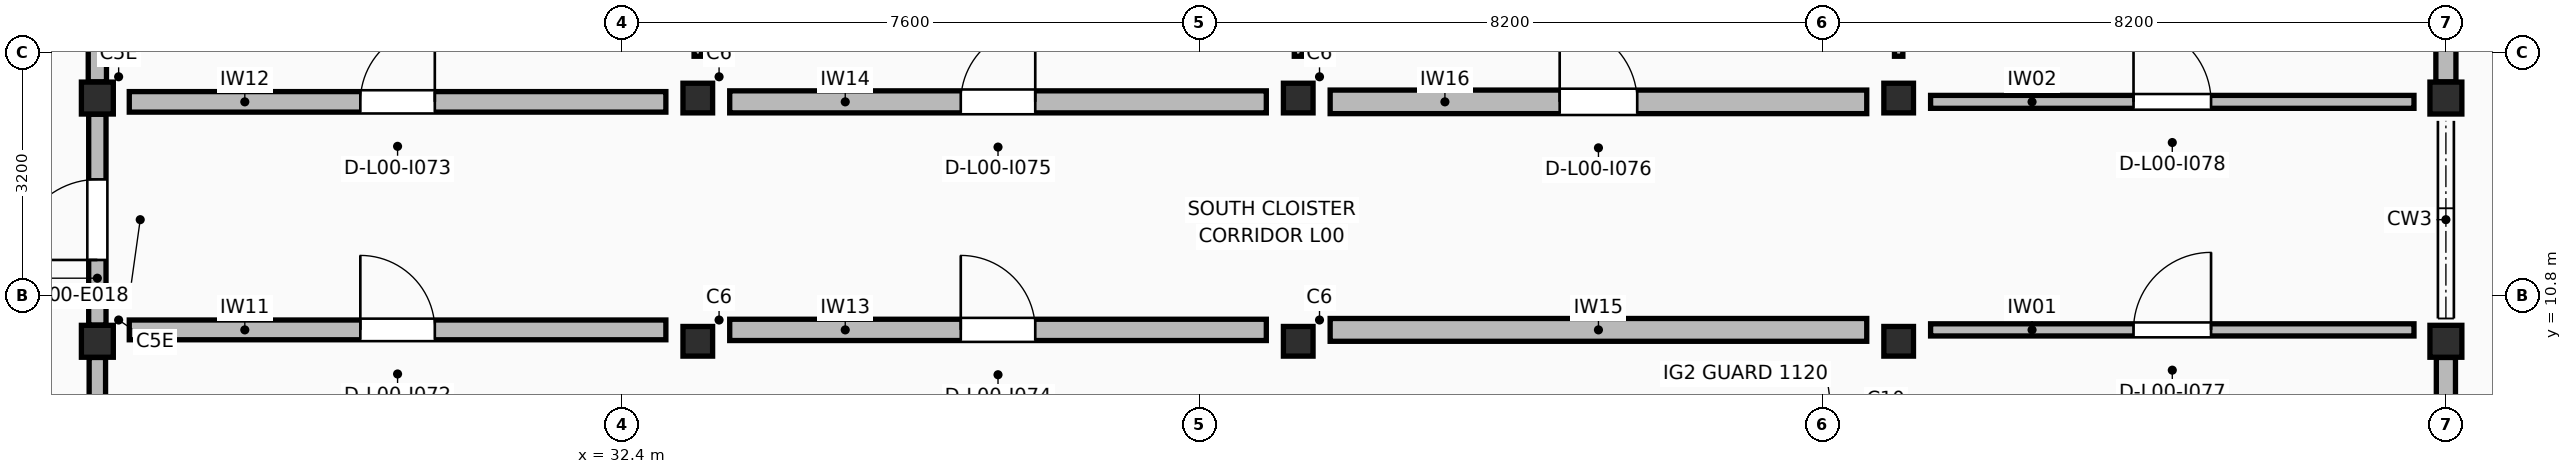
"""IFC4 building model, lengths in metres.
Left out: names, types, materials, properties, quantities, classifications, styles, units other than length and angle.
Written with IfcOpenShell. Run it as: python <this file> out.ifc"""

import sys

from ifc_helpers import new_model, si_unit, direction, frame, frame_2d, origin, origin_2d, place, context, subcontext, project, spatial, rectangle, extrude, element, fill, save


model = new_model("IFC4")
c1 = context("Model", 3, precision=1e-05, world=origin(), true_north=direction((0.0, 1.0)))
c2 = subcontext(c1, "Body", "Model", "MODEL_VIEW")
j1 = project(units=[si_unit("LENGTHUNIT", "METRE"), si_unit("PLANEANGLEUNIT", "RADIAN")], contexts=[c1])
p1 = place(None, origin())
s1 = spatial("IfcSite", under=j1, at=p1, CompositionType="ELEMENT")
p2 = place(p1, origin())
s2 = spatial("IfcBuilding", under=s1, at=p2, CompositionType="ELEMENT")
p3 = place(p2, origin())
s3 = spatial("IfcBuildingStorey", under=s2, at=p3, CompositionType="ELEMENT", Elevation=0.0)
for number, where, z_axis, x_axis in (
    (1, (25.5, 10.2, 0.0), (0.0, 0.0, 1.0), (1.0, 0.0, 0.0)),
    (2, (25.5, 13.4, 0.0), (0.0, 0.0, 1.0), (1.0, 0.0, 0.0)),
):
    element("IfcColumn", number, at=place(p3, frame(where, z_axis=z_axis, x_axis=x_axis)), inside=s3, PredefinedType="COLUMN", context=c2, shape_type="SweptSolid", body=[
        extrude(rectangle(XDim=0.42, YDim=0.42, at=origin_2d()), origin(), (0.0, 0.0, 1.0), 4.42),
    ])
for number, where, z_axis, x_axis in (
    (3, (33.4, 10.2, 0.0), (0.0, 0.0, 1.0), (1.0, 0.0, 0.0)),
    (4, (33.4, 13.4, 0.0), (0.0, 0.0, 1.0), (1.0, 0.0, 0.0)),
    (5, (41.3, 10.2, 0.0), (0.0, 0.0, 1.0), (1.0, 0.0, 0.0)),
    (6, (41.3, 13.4, 0.0), (0.0, 0.0, 1.0), (1.0, 0.0, 0.0)),
    (7, (49.2, 10.2, 0.0), (0.0, 0.0, 1.0), (1.0, 0.0, 0.0)),
    (8, (49.2, 13.4, 0.0), (0.0, 0.0, 1.0), (1.0, 0.0, 0.0)),
):
    element("IfcColumn", number, at=place(p3, frame(where, z_axis=z_axis, x_axis=x_axis)), inside=s3, PredefinedType="COLUMN", context=c2, shape_type="SweptSolid", body=[
        extrude(rectangle(XDim=0.39, YDim=0.39, at=origin_2d()), origin(), (0.0, 0.0, 1.0), 4.42),
    ])
for number, where, z_axis, x_axis in (
    (9, (56.4, 10.2, 0.0), (0.0, 0.0, 1.0), (1.0, 0.0, 0.0)),
    (10, (56.4, 13.4, 0.0), (0.0, 0.0, 1.0), (1.0, 0.0, 0.0)),
):
    element("IfcColumn", number, at=place(p3, frame(where, z_axis=z_axis, x_axis=x_axis)), inside=s3, PredefinedType="COLUMN", context=c2, shape_type="SweptSolid", body=[
        extrude(rectangle(XDim=0.42, YDim=0.42, at=origin_2d()), origin(), (0.0, 0.0, 1.0), 4.42),
    ])
p4 = place(p3, frame((25.5, 4.413, 0.0), z_axis=(0.0, 0.0, 1.0), x_axis=(0.0, 1.0, 0.0)))
e11 = element("IfcWall", 11, at=p4, inside=s3, PredefinedType="STANDARD", context=c2, shape_type="SweptSolid", body=[
    extrude(rectangle(XDim=5.574, YDim=0.216, at=frame_2d((2.787, 0.0))), origin(), (0.0, 0.0, 1.0), 3.4),
])
p5 = place(p4, frame((1.637, 0.0, 0.95)))
e12 = element("IfcOpeningElement", 12, at=p5, cuts=e11, PredefinedType="OPENING", context=c2, shape_type="SweptSolid", body=[
    extrude(rectangle(XDim=2.3, YDim=1.3, at=frame_2d((1.15, 0.65))), frame((0.0, 0.118, 0.0), z_axis=(0.0, -1.0, 0.0), x_axis=(1.0, 0.0, 0.0)), (0.0, 0.0, 1.0), 0.236),
])
p6 = place(p3, frame((25.5, 10.413, 0.0), z_axis=(0.0, 0.0, 1.0), x_axis=(0.0, 1.0, 0.0)))
e13 = element("IfcWall", 13, at=p6, inside=s3, PredefinedType="STANDARD", context=c2, shape_type="SweptSolid", body=[
    extrude(rectangle(XDim=2.774, YDim=0.228, at=frame_2d((1.387, 0.0))), origin(), (0.0, 0.0, 1.0), 3.4),
])
p7 = place(p6, frame((0.857, 0.0, 0.0)))
e14 = element("IfcOpeningElement", 14, at=p7, cuts=e13, PredefinedType="OPENING", context=c2, shape_type="SweptSolid", body=[
    extrude(rectangle(XDim=1.06, YDim=2.18, at=frame_2d((0.53, 1.09))), frame((0.0, 0.124, 0.0), z_axis=(0.0, -1.0, 0.0), x_axis=(1.0, 0.0, 0.0)), (0.0, 0.0, 1.0), 0.248),
])
p8 = place(p3, frame((25.5, 13.613, 0.0), z_axis=(0.0, 0.0, 1.0), x_axis=(0.0, 1.0, 0.0)))
e15 = element("IfcWall", 15, at=p8, inside=s3, PredefinedType="STANDARD", context=c2, shape_type="SweptSolid", body=[
    extrude(rectangle(XDim=7.174, YDim=0.24, at=frame_2d((3.587, 0.0))), origin(), (0.0, 0.0, 1.0), 3.4),
])
p9 = place(p8, frame((2.437, 0.0, 0.95)))
e16 = element("IfcOpeningElement", 16, at=p9, cuts=e15, PredefinedType="OPENING", context=c2, shape_type="SweptSolid", body=[
    extrude(rectangle(XDim=2.3, YDim=1.45, at=frame_2d((1.15, 0.725))), frame((0.0, 0.13, 0.0), z_axis=(0.0, -1.0, 0.0), x_axis=(1.0, 0.0, 0.0)), (0.0, 0.0, 1.0), 0.26),
])
p10 = place(p3, frame((56.4, 4.413, 0.0), z_axis=(0.0, 0.0, 1.0), x_axis=(0.0, 1.0, 0.0)))
e17 = element("IfcWall", 17, at=p10, inside=s3, PredefinedType="STANDARD", context=c2, shape_type="SweptSolid", body=[
    extrude(rectangle(XDim=5.574, YDim=0.252, at=frame_2d((2.787, 0.0))), origin(), (0.0, 0.0, 1.0), 3.4),
])
p11 = place(p10, frame((1.637, 0.0, 0.95)))
e18 = element("IfcOpeningElement", 18, at=p11, cuts=e17, PredefinedType="OPENING", context=c2, shape_type="SweptSolid", body=[
    extrude(rectangle(XDim=2.3, YDim=1.6, at=frame_2d((1.15, 0.8))), frame((0.0, 0.136, 0.0), z_axis=(0.0, -1.0, 0.0), x_axis=(1.0, 0.0, 0.0)), (0.0, 0.0, 1.0), 0.272),
])
p12 = place(p3, frame((56.4, 13.613, 0.0), z_axis=(0.0, 0.0, 1.0), x_axis=(0.0, 1.0, 0.0)))
e19 = element("IfcWall", 19, at=p12, inside=s3, PredefinedType="STANDARD", context=c2, shape_type="SweptSolid", body=[
    extrude(rectangle(XDim=7.174, YDim=0.264, at=frame_2d((3.587, 0.0))), origin(), (0.0, 0.0, 1.0), 3.4),
])
p13 = place(p12, frame((2.377, 0.0, 0.95)))
e20 = element("IfcOpeningElement", 20, at=p13, cuts=e19, PredefinedType="OPENING", context=c2, shape_type="SweptSolid", body=[
    extrude(rectangle(XDim=2.42, YDim=1.15, at=frame_2d((1.21, 0.575))), frame((0.0, 0.142, 0.0), z_axis=(0.0, -1.0, 0.0), x_axis=(1.0, 0.0, 0.0)), (0.0, 0.0, 1.0), 0.284),
])
p14 = place(p3, frame((25.92, 10.35, 0.0), z_axis=(0.0, 0.0, 1.0), x_axis=(1.0, 0.0, 0.0)))
e21 = element("IfcWall", 21, at=p14, inside=s3, PredefinedType="STANDARD", context=c2, shape_type="SweptSolid", body=[
    extrude(rectangle(XDim=7.06, YDim=0.26, at=frame_2d((3.53, 0.0))), origin(), (0.0, 0.0, 1.0), 3.38),
])
p15 = place(p14, frame((3.04, 0.0, 0.0)))
e22 = element("IfcOpeningElement", 22, at=p15, cuts=e21, PredefinedType="OPENING", context=c2, shape_type="SweptSolid", body=[
    extrude(rectangle(XDim=0.98, YDim=2.06, at=frame_2d((0.49, 1.03))), frame((0.0, 0.14, 0.0), z_axis=(0.0, -1.0, 0.0), x_axis=(1.0, 0.0, 0.0)), (0.0, 0.0, 1.0), 0.28),
])
p16 = place(p3, frame((25.92, 13.35, 0.0), z_axis=(0.0, 0.0, 1.0), x_axis=(1.0, 0.0, 0.0)))
e23 = element("IfcWall", 23, at=p16, inside=s3, PredefinedType="STANDARD", context=c2, shape_type="SweptSolid", body=[
    extrude(rectangle(XDim=7.06, YDim=0.27, at=frame_2d((3.53, 0.0))), origin(), (0.0, 0.0, 1.0), 3.38),
])
p17 = place(p16, frame((3.04, 0.0, 0.0)))
e24 = element("IfcOpeningElement", 24, at=p17, cuts=e23, PredefinedType="OPENING", context=c2, shape_type="SweptSolid", body=[
    extrude(rectangle(XDim=0.98, YDim=2.12, at=frame_2d((0.49, 1.06))), frame((0.0, 0.145, 0.0), z_axis=(0.0, -1.0, 0.0), x_axis=(1.0, 0.0, 0.0)), (0.0, 0.0, 1.0), 0.29),
])
p18 = place(p3, frame((33.82, 10.35, 0.0), z_axis=(0.0, 0.0, 1.0), x_axis=(1.0, 0.0, 0.0)))
e25 = element("IfcWall", 25, at=p18, inside=s3, PredefinedType="STANDARD", context=c2, shape_type="SweptSolid", body=[
    extrude(rectangle(XDim=7.06, YDim=0.28, at=frame_2d((3.53, 0.0))), origin(), (0.0, 0.0, 1.0), 3.38),
])
p19 = place(p18, frame((3.04, 0.0, 0.0)))
e26 = element("IfcOpeningElement", 26, at=p19, cuts=e25, PredefinedType="OPENING", context=c2, shape_type="SweptSolid", body=[
    extrude(rectangle(XDim=0.98, YDim=2.18, at=frame_2d((0.49, 1.09))), frame((0.0, 0.15, 0.0), z_axis=(0.0, -1.0, 0.0), x_axis=(1.0, 0.0, 0.0)), (0.0, 0.0, 1.0), 0.3),
])
p20 = place(p3, frame((33.82, 13.35, 0.0), z_axis=(0.0, 0.0, 1.0), x_axis=(1.0, 0.0, 0.0)))
e27 = element("IfcWall", 27, at=p20, inside=s3, PredefinedType="STANDARD", context=c2, shape_type="SweptSolid", body=[
    extrude(rectangle(XDim=7.06, YDim=0.29, at=frame_2d((3.53, 0.0))), origin(), (0.0, 0.0, 1.0), 3.38),
])
p21 = place(p20, frame((3.04, 0.0, 0.0)))
e28 = element("IfcOpeningElement", 28, at=p21, cuts=e27, PredefinedType="OPENING", context=c2, shape_type="SweptSolid", body=[
    extrude(rectangle(XDim=0.98, YDim=2.24, at=frame_2d((0.49, 1.12))), frame((0.0, 0.155, 0.0), z_axis=(0.0, -1.0, 0.0), x_axis=(1.0, 0.0, 0.0)), (0.0, 0.0, 1.0), 0.31),
])
p22 = place(p3, frame((41.72, 10.35, 0.0), z_axis=(0.0, 0.0, 1.0), x_axis=(1.0, 0.0, 0.0)))
e29 = element("IfcWall", 29, at=p22, inside=s3, PredefinedType="STANDARD", context=c2, shape_type="SweptSolid", body=[
    extrude(rectangle(XDim=7.06, YDim=0.3, at=frame_2d((3.53, 0.0))), origin(), (0.0, 0.0, 1.0), 3.38),
])
p23 = place(p3, frame((41.72, 13.35, 0.0), z_axis=(0.0, 0.0, 1.0), x_axis=(1.0, 0.0, 0.0)))
e30 = element("IfcWall", 30, at=p23, inside=s3, PredefinedType="STANDARD", context=c2, shape_type="SweptSolid", body=[
    extrude(rectangle(XDim=7.06, YDim=0.31, at=frame_2d((3.53, 0.0))), origin(), (0.0, 0.0, 1.0), 3.38),
])
p24 = place(p23, frame((3.02, 0.0, 0.0)))
e31 = element("IfcOpeningElement", 31, at=p24, cuts=e30, PredefinedType="OPENING", context=c2, shape_type="SweptSolid", body=[
    extrude(rectangle(XDim=1.02, YDim=2.06, at=frame_2d((0.51, 1.03))), frame((0.0, 0.165, 0.0), z_axis=(0.0, -1.0, 0.0), x_axis=(1.0, 0.0, 0.0)), (0.0, 0.0, 1.0), 0.33),
])
p25 = place(p3, frame((49.62, 10.35, 0.0), z_axis=(0.0, 0.0, 1.0), x_axis=(1.0, 0.0, 0.0)))
e32 = element("IfcWall", 32, at=p25, inside=s3, PredefinedType="STANDARD", context=c2, shape_type="SweptSolid", body=[
    extrude(rectangle(XDim=6.36, YDim=0.16, at=frame_2d((3.18, 0.0))), origin(), (0.0, 0.0, 1.0), 3.38),
])
p26 = place(p25, frame((2.67, 0.0, 0.0)))
e33 = element("IfcOpeningElement", 33, at=p26, cuts=e32, PredefinedType="OPENING", context=c2, shape_type="SweptSolid", body=[
    extrude(rectangle(XDim=1.02, YDim=2.12, at=frame_2d((0.51, 1.06))), frame((0.0, 0.09, 0.0), z_axis=(0.0, -1.0, 0.0), x_axis=(1.0, 0.0, 0.0)), (0.0, 0.0, 1.0), 0.18),
])
p27 = place(p3, frame((49.62, 13.35, 0.0), z_axis=(0.0, 0.0, 1.0), x_axis=(1.0, 0.0, 0.0)))
e34 = element("IfcWall", 34, at=p27, inside=s3, PredefinedType="STANDARD", context=c2, shape_type="SweptSolid", body=[
    extrude(rectangle(XDim=6.36, YDim=0.17, at=frame_2d((3.18, 0.0))), origin(), (0.0, 0.0, 1.0), 3.38),
])
p28 = place(p27, frame((2.67, 0.0, 0.0)))
e35 = element("IfcOpeningElement", 35, at=p28, cuts=e34, PredefinedType="OPENING", context=c2, shape_type="SweptSolid", body=[
    extrude(rectangle(XDim=1.02, YDim=2.18, at=frame_2d((0.51, 1.09))), frame((0.0, 0.095, 0.0), z_axis=(0.0, -1.0, 0.0), x_axis=(1.0, 0.0, 0.0)), (0.0, 0.0, 1.0), 0.19),
])
p29 = place(p3, frame((33.4, 13.95, 0.0), z_axis=(0.0, 0.0, 1.0), x_axis=(0.0, 1.0, 0.0)))
e36 = element("IfcWall", 36, at=p29, inside=s3, PredefinedType="PARTITIONING", context=c2, shape_type="SweptSolid", body=[
    extrude(rectangle(XDim=6.2, YDim=0.098, at=frame_2d((3.1, 0.0))), origin(), (0.0, 0.0, 1.0), 3.38),
])
p30 = place(p3, frame((41.3, 13.95, 0.0), z_axis=(0.0, 0.0, 1.0), x_axis=(0.0, 1.0, 0.0)))
e37 = element("IfcWall", 37, at=p30, inside=s3, PredefinedType="PARTITIONING", context=c2, shape_type="SweptSolid", body=[
    extrude(rectangle(XDim=6.2, YDim=0.104, at=frame_2d((3.1, 0.0))), origin(), (0.0, 0.0, 1.0), 3.38),
])
p31 = place(p3, frame((49.2, 13.95, 0.0), z_axis=(0.0, 0.0, 1.0), x_axis=(0.0, 1.0, 0.0)))
e38 = element("IfcWall", 38, at=p31, inside=s3, PredefinedType="PARTITIONING", context=c2, shape_type="SweptSolid", body=[
    extrude(rectangle(XDim=6.2, YDim=0.11, at=frame_2d((3.1, 0.0))), origin(), (0.0, 0.0, 1.0), 3.38),
])
p32 = place(p7, origin())
e39 = element("IfcDoor", 39, at=p32, inside=s3, OperationType="SINGLE_SWING_LEFT", PredefinedType="DOOR", context=c2, shape_type="SweptSolid", body=[
    extrude(rectangle(XDim=1.06, YDim=2.18, at=frame_2d((0.53, 1.09))), frame((0.0, 0.025, 0.0), z_axis=(0.0, -1.0, 0.0), x_axis=(1.0, 0.0, 0.0)), (0.0, 0.0, 1.0), 0.05),
])
fill(e14, e39)
p33 = place(p15, origin())
e40 = element("IfcDoor", 40, at=p33, inside=s3, OperationType="SINGLE_SWING_LEFT", PredefinedType="DOOR", context=c2, shape_type="SweptSolid", body=[
    extrude(rectangle(XDim=0.98, YDim=2.06, at=frame_2d((0.49, 1.03))), frame((0.0, 0.025, 0.0), z_axis=(0.0, -1.0, 0.0), x_axis=(1.0, 0.0, 0.0)), (0.0, 0.0, 1.0), 0.05),
])
fill(e22, e40)
p34 = place(p17, frame((0.98, 0.0, 0.0), z_axis=(0.0, 0.0, 1.0), x_axis=(-1.0, 0.0, 0.0)))
e41 = element("IfcDoor", 41, at=p34, inside=s3, OperationType="SINGLE_SWING_RIGHT", PredefinedType="DOOR", context=c2, shape_type="SweptSolid", body=[
    extrude(rectangle(XDim=0.98, YDim=2.12, at=frame_2d((0.49, 1.06))), frame((0.0, 0.025, 0.0), z_axis=(0.0, -1.0, 0.0), x_axis=(1.0, 0.0, 0.0)), (0.0, 0.0, 1.0), 0.05),
])
fill(e24, e41)
p35 = place(p19, origin())
e42 = element("IfcDoor", 42, at=p35, inside=s3, OperationType="SINGLE_SWING_LEFT", PredefinedType="DOOR", context=c2, shape_type="SweptSolid", body=[
    extrude(rectangle(XDim=0.98, YDim=2.18, at=frame_2d((0.49, 1.09))), frame((0.0, 0.025, 0.0), z_axis=(0.0, -1.0, 0.0), x_axis=(1.0, 0.0, 0.0)), (0.0, 0.0, 1.0), 0.05),
])
fill(e26, e42)
p36 = place(p21, frame((0.98, 0.0, 0.0), z_axis=(0.0, 0.0, 1.0), x_axis=(-1.0, 0.0, 0.0)))
e43 = element("IfcDoor", 43, at=p36, inside=s3, OperationType="SINGLE_SWING_RIGHT", PredefinedType="DOOR", context=c2, shape_type="SweptSolid", body=[
    extrude(rectangle(XDim=0.98, YDim=2.24, at=frame_2d((0.49, 1.12))), frame((0.0, 0.025, 0.0), z_axis=(0.0, -1.0, 0.0), x_axis=(1.0, 0.0, 0.0)), (0.0, 0.0, 1.0), 0.05),
])
fill(e28, e43)
p37 = place(p24, frame((1.02, 0.0, 0.0), z_axis=(0.0, 0.0, 1.0), x_axis=(-1.0, 0.0, 0.0)))
e44 = element("IfcDoor", 44, at=p37, inside=s3, OperationType="SINGLE_SWING_LEFT", PredefinedType="DOOR", context=c2, shape_type="SweptSolid", body=[
    extrude(rectangle(XDim=1.02, YDim=2.06, at=frame_2d((0.51, 1.03))), frame((0.0, 0.025, 0.0), z_axis=(0.0, -1.0, 0.0), x_axis=(1.0, 0.0, 0.0)), (0.0, 0.0, 1.0), 0.05),
])
fill(e31, e44)
p38 = place(p26, origin())
e45 = element("IfcDoor", 45, at=p38, inside=s3, OperationType="SINGLE_SWING_RIGHT", PredefinedType="DOOR", context=c2, shape_type="SweptSolid", body=[
    extrude(rectangle(XDim=1.02, YDim=2.12, at=frame_2d((0.51, 1.06))), frame((0.0, 0.025, 0.0), z_axis=(0.0, -1.0, 0.0), x_axis=(1.0, 0.0, 0.0)), (0.0, 0.0, 1.0), 0.05),
])
fill(e33, e45)
p39 = place(p28, frame((1.02, 0.0, 0.0), z_axis=(0.0, 0.0, 1.0), x_axis=(-1.0, 0.0, 0.0)))
e46 = element("IfcDoor", 46, at=p39, inside=s3, OperationType="SINGLE_SWING_LEFT", PredefinedType="DOOR", context=c2, shape_type="SweptSolid", body=[
    extrude(rectangle(XDim=1.02, YDim=2.18, at=frame_2d((0.51, 1.09))), frame((0.0, 0.025, 0.0), z_axis=(0.0, -1.0, 0.0), x_axis=(1.0, 0.0, 0.0)), (0.0, 0.0, 1.0), 0.05),
])
fill(e35, e46)
save(model, sys.argv[1])
